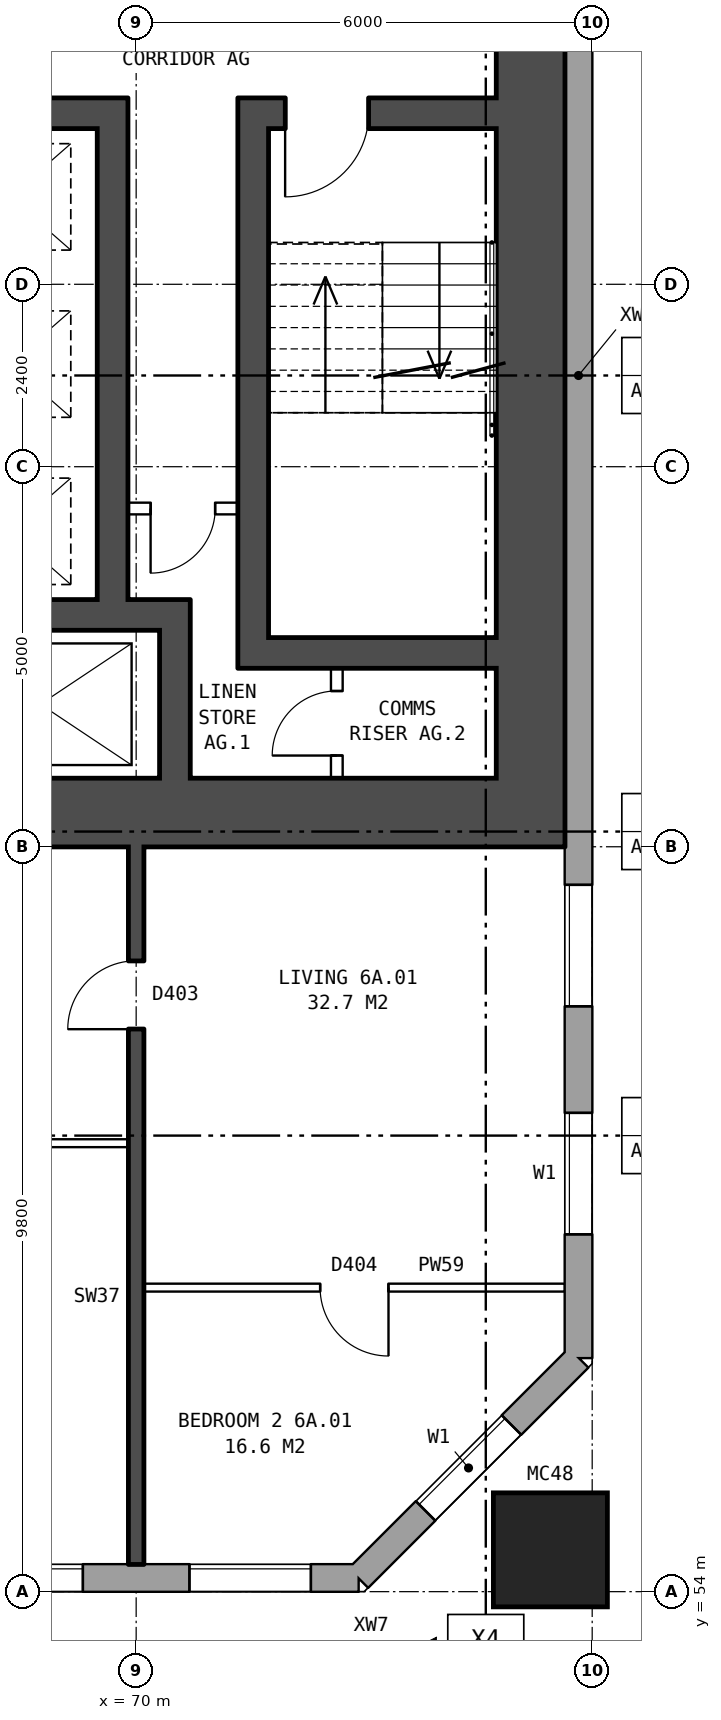
"""IFC4 building model, lengths in metres.
Left out: names, types, materials, properties, quantities, classifications, styles, units other than length and angle.
Written with IfcOpenShell. Run it as: python <this file> out.ifc"""

import sys

from ifc_helpers import new_model, si_unit, direction, frame, frame_2d, origin, origin_2d, place, context, subcontext, project, spatial, rectangle, hollow_rectangle, extrude, element, fill, save


model = new_model("IFC4")
c1 = context("Model", 3, precision=1e-05, world=origin(), true_north=direction((0.0, 1.0)))
c2 = subcontext(c1, "Body", "Model", "MODEL_VIEW")
j1 = project(units=[si_unit("LENGTHUNIT", "METRE"), si_unit("PLANEANGLEUNIT", "RADIAN")], contexts=[c1])
p1 = place(None, origin())
s1 = spatial("IfcSite", under=j1, at=p1, CompositionType="ELEMENT")
p2 = place(p1, origin())
s2 = spatial("IfcBuilding", under=s1, at=p2, CompositionType="ELEMENT")
p3 = place(p2, frame((0.0, 0.0, 25.7)))
s3 = spatial("IfcBuildingStorey", under=s2, at=p3, CompositionType="ELEMENT", Elevation=25.7)
p4 = place(p3, frame((75.45, 54.55, 0.0), z_axis=(0.0, 0.0, 1.0), x_axis=(1.0, 0.0, 0.0)))
e1 = element("IfcColumn", 1, at=p4, inside=s3, PredefinedType="COLUMN", context=c2, shape_type="SweptSolid", body=[
    extrude(hollow_rectangle(XDim=1.5, YDim=1.5, WallThickness=0.08, at=origin_2d()), origin(), (0.0, 0.0, 1.0), 3.1),
])
p5 = place(p3, frame((22.825, 54.18, 0.0), z_axis=(0.0, 0.0, 1.0), x_axis=(1.0, 0.0, 0.0)))
e2 = element("IfcWall", 2, at=p5, inside=s3, PredefinedType="STANDARD", context=c2, shape_type="SweptSolid", body=[
    extrude(rectangle(XDim=50.101, YDim=0.36, at=frame_2d((25.05, 0.0))), origin(), (0.0, 0.0, 1.0), 2.85),
])
p6 = place(p5, frame((2.875, 0.0, 0.8)))
e3 = element("IfcOpeningElement", 3, at=p6, cuts=e2, PredefinedType="OPENING", context=c2, shape_type="SweptSolid", body=[
    extrude(rectangle(XDim=1.6, YDim=1.8, at=frame_2d((0.8, 0.9))), frame((0.0, 0.19, 0.0), z_axis=(0.0, -1.0, 0.0), x_axis=(1.0, 0.0, 0.0)), (0.0, 0.0, 1.0), 0.38),
])
p7 = place(p5, frame((5.875, 0.0, 0.8)))
e4 = element("IfcOpeningElement", 4, at=p7, cuts=e2, PredefinedType="OPENING", context=c2, shape_type="SweptSolid", body=[
    extrude(rectangle(XDim=1.6, YDim=1.8, at=frame_2d((0.8, 0.9))), frame((0.0, 0.19, 0.0), z_axis=(0.0, -1.0, 0.0), x_axis=(1.0, 0.0, 0.0)), (0.0, 0.0, 1.0), 0.38),
])
p8 = place(p5, frame((7.775, 0.0, 1.6)))
e5 = element("IfcOpeningElement", 5, at=p8, cuts=e2, PredefinedType="OPENING", context=c2, shape_type="SweptSolid", body=[
    extrude(rectangle(XDim=0.8, YDim=0.9, at=frame_2d((0.4, 0.45))), frame((0.0, 0.19, 0.0), z_axis=(0.0, -1.0, 0.0), x_axis=(1.0, 0.0, 0.0)), (0.0, 0.0, 1.0), 0.38),
])
p9 = place(p5, frame((11.875, 0.0, 0.8)))
e6 = element("IfcOpeningElement", 6, at=p9, cuts=e2, PredefinedType="OPENING", context=c2, shape_type="SweptSolid", body=[
    extrude(rectangle(XDim=1.6, YDim=1.8, at=frame_2d((0.8, 0.9))), frame((0.0, 0.19, 0.0), z_axis=(0.0, -1.0, 0.0), x_axis=(1.0, 0.0, 0.0)), (0.0, 0.0, 1.0), 0.38),
])
p10 = place(p5, frame((14.875, 0.0, 0.8)))
e7 = element("IfcOpeningElement", 7, at=p10, cuts=e2, PredefinedType="OPENING", context=c2, shape_type="SweptSolid", body=[
    extrude(rectangle(XDim=1.6, YDim=1.8, at=frame_2d((0.8, 0.9))), frame((0.0, 0.19, 0.0), z_axis=(0.0, -1.0, 0.0), x_axis=(1.0, 0.0, 0.0)), (0.0, 0.0, 1.0), 0.38),
])
p11 = place(p5, frame((17.875, 0.0, 0.8)))
e8 = element("IfcOpeningElement", 8, at=p11, cuts=e2, PredefinedType="OPENING", context=c2, shape_type="SweptSolid", body=[
    extrude(rectangle(XDim=1.6, YDim=1.8, at=frame_2d((0.8, 0.9))), frame((0.0, 0.19, 0.0), z_axis=(0.0, -1.0, 0.0), x_axis=(1.0, 0.0, 0.0)), (0.0, 0.0, 1.0), 0.38),
])
p12 = place(p5, frame((20.875, 0.0, 0.8)))
e9 = element("IfcOpeningElement", 9, at=p12, cuts=e2, PredefinedType="OPENING", context=c2, shape_type="SweptSolid", body=[
    extrude(rectangle(XDim=1.6, YDim=1.8, at=frame_2d((0.8, 0.9))), frame((0.0, 0.19, 0.0), z_axis=(0.0, -1.0, 0.0), x_axis=(1.0, 0.0, 0.0)), (0.0, 0.0, 1.0), 0.38),
])
p13 = place(p5, frame((23.875, 0.0, 0.8)))
e10 = element("IfcOpeningElement", 10, at=p13, cuts=e2, PredefinedType="OPENING", context=c2, shape_type="SweptSolid", body=[
    extrude(rectangle(XDim=1.6, YDim=1.8, at=frame_2d((0.8, 0.9))), frame((0.0, 0.19, 0.0), z_axis=(0.0, -1.0, 0.0), x_axis=(1.0, 0.0, 0.0)), (0.0, 0.0, 1.0), 0.38),
])
p14 = place(p5, frame((26.875, 0.0, 0.8)))
e11 = element("IfcOpeningElement", 11, at=p14, cuts=e2, PredefinedType="OPENING", context=c2, shape_type="SweptSolid", body=[
    extrude(rectangle(XDim=1.6, YDim=1.8, at=frame_2d((0.8, 0.9))), frame((0.0, 0.19, 0.0), z_axis=(0.0, -1.0, 0.0), x_axis=(1.0, 0.0, 0.0)), (0.0, 0.0, 1.0), 0.38),
])
p15 = place(p5, frame((29.875, 0.0, 0.8)))
e12 = element("IfcOpeningElement", 12, at=p15, cuts=e2, PredefinedType="OPENING", context=c2, shape_type="SweptSolid", body=[
    extrude(rectangle(XDim=1.6, YDim=1.8, at=frame_2d((0.8, 0.9))), frame((0.0, 0.19, 0.0), z_axis=(0.0, -1.0, 0.0), x_axis=(1.0, 0.0, 0.0)), (0.0, 0.0, 1.0), 0.38),
])
p16 = place(p5, frame((32.875, 0.0, 0.8)))
e13 = element("IfcOpeningElement", 13, at=p16, cuts=e2, PredefinedType="OPENING", context=c2, shape_type="SweptSolid", body=[
    extrude(rectangle(XDim=1.6, YDim=1.8, at=frame_2d((0.8, 0.9))), frame((0.0, 0.19, 0.0), z_axis=(0.0, -1.0, 0.0), x_axis=(1.0, 0.0, 0.0)), (0.0, 0.0, 1.0), 0.38),
])
p17 = place(p5, frame((35.875, 0.0, 0.8)))
e14 = element("IfcOpeningElement", 14, at=p17, cuts=e2, PredefinedType="OPENING", context=c2, shape_type="SweptSolid", body=[
    extrude(rectangle(XDim=1.6, YDim=1.8, at=frame_2d((0.8, 0.9))), frame((0.0, 0.19, 0.0), z_axis=(0.0, -1.0, 0.0), x_axis=(1.0, 0.0, 0.0)), (0.0, 0.0, 1.0), 0.38),
])
p18 = place(p5, frame((38.325, 0.0, 0.15)))
e15 = element("IfcOpeningElement", 15, at=p18, cuts=e2, PredefinedType="OPENING", context=c2, shape_type="SweptSolid", body=[
    extrude(rectangle(XDim=1.2, YDim=1.8, at=frame_2d((0.6, 0.9))), frame((0.0, 0.19, 0.0), z_axis=(0.0, -1.0, 0.0), x_axis=(1.0, 0.0, 0.0)), (0.0, 0.0, 1.0), 0.38),
])
p19 = place(p5, frame((41.825, 0.0, 1.4)))
e16 = element("IfcOpeningElement", 16, at=p19, cuts=e2, PredefinedType="OPENING", context=c2, shape_type="SweptSolid", body=[
    extrude(rectangle(XDim=1.0, YDim=1.2, at=frame_2d((0.5, 0.6))), frame((0.0, 0.19, 0.0), z_axis=(0.0, -1.0, 0.0), x_axis=(1.0, 0.0, 0.0)), (0.0, 0.0, 1.0), 0.38),
])
p20 = place(p5, frame((44.875, 0.0, 0.8)))
e17 = element("IfcOpeningElement", 17, at=p20, cuts=e2, PredefinedType="OPENING", context=c2, shape_type="SweptSolid", body=[
    extrude(rectangle(XDim=1.6, YDim=1.8, at=frame_2d((0.8, 0.9))), frame((0.0, 0.19, 0.0), z_axis=(0.0, -1.0, 0.0), x_axis=(1.0, 0.0, 0.0)), (0.0, 0.0, 1.0), 0.38),
])
p21 = place(p5, frame((47.875, 0.0, 0.8)))
e18 = element("IfcOpeningElement", 18, at=p21, cuts=e2, PredefinedType="OPENING", context=c2, shape_type="SweptSolid", body=[
    extrude(rectangle(XDim=1.6, YDim=1.8, at=frame_2d((0.8, 0.9))), frame((0.0, 0.19, 0.0), z_axis=(0.0, -1.0, 0.0), x_axis=(1.0, 0.0, 0.0)), (0.0, 0.0, 1.0), 0.38),
])
p22 = place(p5, frame((10.175, 0.0, 0.8)))
e19 = element("IfcOpeningElement", 19, at=p22, cuts=e2, PredefinedType="OPENING", context=c2, shape_type="SweptSolid", body=[
    extrude(rectangle(XDim=0.8, YDim=0.9, at=frame_2d((0.4, 0.45))), frame((0.0, 0.19, 0.0), z_axis=(0.0, -1.0, 0.0), x_axis=(1.0, 0.0, 0.0)), (0.0, 0.0, 1.0), 0.38),
])
p23 = place(p5, frame((39.825, 0.0, 0.15)))
e20 = element("IfcOpeningElement", 20, at=p23, cuts=e2, PredefinedType="OPENING", context=c2, shape_type="SweptSolid", body=[
    extrude(rectangle(XDim=1.0, YDim=0.9, at=frame_2d((0.5, 0.45))), frame((0.0, 0.19, 0.0), z_axis=(0.0, -1.0, 0.0), x_axis=(1.0, 0.0, 0.0)), (0.0, 0.0, 1.0), 0.38),
])
p24 = place(p5, frame((43.125, 0.0, 0.8)))
e21 = element("IfcOpeningElement", 21, at=p24, cuts=e2, PredefinedType="OPENING", context=c2, shape_type="SweptSolid", body=[
    extrude(rectangle(XDim=1.4, YDim=1.8, at=frame_2d((0.7, 0.9))), frame((0.0, 0.19, 0.0), z_axis=(0.0, -1.0, 0.0), x_axis=(1.0, 0.0, 0.0)), (0.0, 0.0, 1.0), 0.38),
])
p25 = place(p3, frame((72.925, 54.18, 0.0), z_axis=(0.0, 0.0, 1.0), x_axis=(0.707106781187, 0.707106781187, 0.0)))
e22 = element("IfcWall", 22, at=p25, inside=s3, PredefinedType="STANDARD", context=c2, shape_type="SweptSolid", body=[
    extrude(rectangle(XDim=4.094, YDim=0.36, at=frame_2d((2.047, 0.0))), origin(), (0.0, 0.0, 1.0), 2.85),
])
p26 = place(p25, frame((1.247, 0.0, 0.8)))
e23 = element("IfcOpeningElement", 23, at=p26, cuts=e22, PredefinedType="OPENING", context=c2, shape_type="SweptSolid", body=[
    extrude(rectangle(XDim=1.6, YDim=1.8, at=frame_2d((0.8, 0.9))), frame((0.0, 0.19, 0.0), z_axis=(0.0, -1.0, 0.0), x_axis=(1.0, 0.0, 0.0)), (0.0, 0.0, 1.0), 0.38),
])
p27 = place(p3, frame((75.82, 57.075, 0.0), z_axis=(0.0, 0.0, 1.0), x_axis=(0.0, 1.0, 0.0)))
e24 = element("IfcWall", 24, at=p27, inside=s3, PredefinedType="STANDARD", context=c2, shape_type="SweptSolid", body=[
    extrude(rectangle(XDim=25.851, YDim=0.36, at=frame_2d((12.925, 0.0))), origin(), (0.0, 0.0, 1.0), 2.85),
])
p28 = place(p27, frame((1.625, 0.0, 0.8)))
e25 = element("IfcOpeningElement", 25, at=p28, cuts=e24, PredefinedType="OPENING", context=c2, shape_type="SweptSolid", body=[
    extrude(rectangle(XDim=1.6, YDim=1.8, at=frame_2d((0.8, 0.9))), frame((0.0, 0.19, 0.0), z_axis=(0.0, -1.0, 0.0), x_axis=(1.0, 0.0, 0.0)), (0.0, 0.0, 1.0), 0.38),
])
p29 = place(p27, frame((4.625, 0.0, 0.8)))
e26 = element("IfcOpeningElement", 26, at=p29, cuts=e24, PredefinedType="OPENING", context=c2, shape_type="SweptSolid", body=[
    extrude(rectangle(XDim=1.6, YDim=1.8, at=frame_2d((0.8, 0.9))), frame((0.0, 0.19, 0.0), z_axis=(0.0, -1.0, 0.0), x_axis=(1.0, 0.0, 0.0)), (0.0, 0.0, 1.0), 0.38),
])
p30 = place(p27, frame((19.625, 0.0, 0.8)))
e27 = element("IfcOpeningElement", 27, at=p30, cuts=e24, PredefinedType="OPENING", context=c2, shape_type="SweptSolid", body=[
    extrude(rectangle(XDim=1.6, YDim=1.8, at=frame_2d((0.8, 0.9))), frame((0.0, 0.19, 0.0), z_axis=(0.0, -1.0, 0.0), x_axis=(1.0, 0.0, 0.0)), (0.0, 0.0, 1.0), 0.38),
])
p31 = place(p27, frame((22.625, 0.0, 0.8)))
e28 = element("IfcOpeningElement", 28, at=p31, cuts=e24, PredefinedType="OPENING", context=c2, shape_type="SweptSolid", body=[
    extrude(rectangle(XDim=1.6, YDim=1.8, at=frame_2d((0.8, 0.9))), frame((0.0, 0.19, 0.0), z_axis=(0.0, -1.0, 0.0), x_axis=(1.0, 0.0, 0.0)), (0.0, 0.0, 1.0), 0.38),
])
p32 = place(p3, frame((75.19, 64.7, 0.0), z_axis=(0.0, 0.0, 1.0), x_axis=(0.0, 1.0, 0.0)))
e29 = element("IfcWall", 29, at=p32, inside=s3, PredefinedType="SHEAR", context=c2, shape_type="SweptSolid", body=[
    extrude(rectangle(XDim=10.6, YDim=0.9, at=frame_2d((5.3, 0.0))), origin(), (0.0, 0.0, 1.0), 2.85),
])
p33 = place(p3, frame((66.64, 64.25, 0.0), z_axis=(0.0, 0.0, 1.0), x_axis=(1.0, 0.0, 0.0)))
e30 = element("IfcWall", 30, at=p33, inside=s3, PredefinedType="SHEAR", context=c2, shape_type="SweptSolid", body=[
    extrude(rectangle(XDim=9.0, YDim=0.9, at=frame_2d((4.5, 0.0))), origin(), (0.0, 0.0, 1.0), 2.85),
])
p34 = place(p3, frame((71.74, 66.35, 0.0), z_axis=(0.0, 0.0, 1.0), x_axis=(1.0, 0.0, 0.0)))
e31 = element("IfcWall", 31, at=p34, inside=s3, PredefinedType="SHEAR", context=c2, shape_type="SweptSolid", body=[
    extrude(rectangle(XDim=3.0, YDim=0.4, at=frame_2d((1.5, 0.0))), origin(), (0.0, 0.0, 1.0), 2.85),
])
p35 = place(p3, frame((67.54, 66.85, 0.0), z_axis=(0.0, 0.0, 1.0), x_axis=(1.0, 0.0, 0.0)))
e32 = element("IfcWall", 32, at=p35, inside=s3, PredefinedType="SHEAR", context=c2, shape_type="SweptSolid", body=[
    extrude(rectangle(XDim=3.17, YDim=0.4, at=frame_2d((1.585, 0.0))), origin(), (0.0, 0.0, 1.0), 2.85),
])
p36 = place(p3, frame((69.89, 68.25, 0.0), z_axis=(0.0, 0.0, 1.0), x_axis=(1.0, 0.0, 0.0)))
e33 = element("IfcWall", 33, at=p36, inside=s3, PredefinedType="PARTITIONING", context=c2, shape_type="SweptSolid", body=[
    extrude(rectangle(XDim=1.45, YDim=0.15, at=frame_2d((0.725, 0.0))), origin(), (0.0, 0.0, 1.0), 2.85),
])
p37 = place(p36, frame((0.3, 0.0, 0.0)))
e34 = element("IfcOpeningElement", 34, at=p37, cuts=e33, PredefinedType="OPENING", context=c2, shape_type="SweptSolid", body=[
    extrude(rectangle(XDim=0.85, YDim=2.1, at=frame_2d((0.425, 1.05))), frame((0.0, 0.085, 0.0), z_axis=(0.0, -1.0, 0.0), x_axis=(1.0, 0.0, 0.0)), (0.0, 0.0, 1.0), 0.17),
])
p38 = place(p3, frame((67.54, 73.45, 0.0), z_axis=(0.0, 0.0, 1.0), x_axis=(1.0, 0.0, 0.0)))
e35 = element("IfcWall", 35, at=p38, inside=s3, PredefinedType="SHEAR", context=c2, shape_type="SweptSolid", body=[
    extrude(rectangle(XDim=1.95, YDim=0.4, at=frame_2d((0.975, 0.0))), origin(), (0.0, 0.0, 1.0), 2.85),
])
p39 = place(p3, frame((71.74, 73.45, 0.0), z_axis=(0.0, 0.0, 1.0), x_axis=(1.0, 0.0, 0.0)))
e36 = element("IfcWall", 36, at=p39, inside=s3, PredefinedType="SHEAR", context=c2, shape_type="SweptSolid", body=[
    extrude(rectangle(XDim=3.0, YDim=0.4, at=frame_2d((1.5, 0.0))), origin(), (0.0, 0.0, 1.0), 2.85),
])
p40 = place(p39, frame((0.22, 0.0, 0.0)))
e37 = element("IfcOpeningElement", 37, at=p40, cuts=e36, PredefinedType="OPENING", context=c2, shape_type="SweptSolid", body=[
    extrude(rectangle(XDim=1.1, YDim=2.1, at=frame_2d((0.55, 1.05))), frame((0.0, 0.21, 0.0), z_axis=(0.0, -1.0, 0.0), x_axis=(1.0, 0.0, 0.0)), (0.0, 0.0, 1.0), 0.42),
])
p41 = place(p3, frame((69.69, 67.05, 0.0), z_axis=(0.0, 0.0, 1.0), x_axis=(0.0, 1.0, 0.0)))
e38 = element("IfcWall", 38, at=p41, inside=s3, PredefinedType="SHEAR", context=c2, shape_type="SweptSolid", body=[
    extrude(rectangle(XDim=6.6, YDim=0.4, at=frame_2d((3.3, 0.0))), origin(), (0.0, 0.0, 1.0), 2.85),
])
p42 = place(p3, frame((70.51, 64.7, 0.0), z_axis=(0.0, 0.0, 1.0), x_axis=(0.0, 1.0, 0.0)))
e39 = element("IfcWall", 39, at=p42, inside=s3, PredefinedType="SHEAR", context=c2, shape_type="SweptSolid", body=[
    extrude(rectangle(XDim=1.95, YDim=0.4, at=frame_2d((0.975, 0.0))), origin(), (0.0, 0.0, 1.0), 2.85),
])
p43 = place(p3, frame((71.54, 66.15, 0.0), z_axis=(0.0, 0.0, 1.0), x_axis=(0.0, 1.0, 0.0)))
e40 = element("IfcWall", 40, at=p43, inside=s3, PredefinedType="SHEAR", context=c2, shape_type="SweptSolid", body=[
    extrude(rectangle(XDim=7.5, YDim=0.4, at=frame_2d((3.75, 0.0))), origin(), (0.0, 0.0, 1.0), 2.85),
])
p44 = place(p3, frame((72.64, 64.7, 0.0), z_axis=(0.0, 0.0, 1.0), x_axis=(0.0, 1.0, 0.0)))
e41 = element("IfcWall", 41, at=p44, inside=s3, PredefinedType="PARTITIONING", context=c2, shape_type="SweptSolid", body=[
    extrude(rectangle(XDim=1.45, YDim=0.15, at=frame_2d((0.725, 0.0))), origin(), (0.0, 0.0, 1.0), 2.85),
])
p45 = place(p44, frame((0.3, 0.0, 0.0)))
e42 = element("IfcOpeningElement", 42, at=p45, cuts=e41, PredefinedType="OPENING", context=c2, shape_type="SweptSolid", body=[
    extrude(rectangle(XDim=0.85, YDim=2.1, at=frame_2d((0.425, 1.05))), frame((0.0, 0.085, 0.0), z_axis=(0.0, -1.0, 0.0), x_axis=(1.0, 0.0, 0.0)), (0.0, 0.0, 1.0), 0.17),
])
p46 = place(p3, frame((70.1, 58.0, 0.0), z_axis=(0.0, 0.0, 1.0), x_axis=(1.0, 0.0, 0.0)))
e43 = element("IfcWall", 43, at=p46, inside=s3, PredefinedType="PARTITIONING", context=c2, shape_type="SweptSolid", body=[
    extrude(rectangle(XDim=5.54, YDim=0.1, at=frame_2d((2.77, 0.0))), origin(), (0.0, 0.0, 1.0), 2.85),
])
p47 = place(p46, frame((2.32, 0.0, 0.0)))
e44 = element("IfcOpeningElement", 44, at=p47, cuts=e43, PredefinedType="OPENING", context=c2, shape_type="SweptSolid", body=[
    extrude(rectangle(XDim=0.9, YDim=2.1, at=frame_2d((0.45, 1.05))), frame((0.0, 0.06, 0.0), z_axis=(0.0, -1.0, 0.0), x_axis=(1.0, 0.0, 0.0)), (0.0, 0.0, 1.0), 0.12),
])
p48 = place(p3, frame((64.1, 59.9, 0.0), z_axis=(0.0, 0.0, 1.0), x_axis=(1.0, 0.0, 0.0)))
e45 = element("IfcWall", 45, at=p48, inside=s3, PredefinedType="PARTITIONING", context=c2, shape_type="SweptSolid", body=[
    extrude(rectangle(XDim=5.8, YDim=0.1, at=frame_2d((2.9, 0.0))), origin(), (0.0, 0.0, 1.0), 2.85),
])
p49 = place(p48, frame((3.6, 0.0, 0.0)))
e46 = element("IfcOpeningElement", 46, at=p49, cuts=e45, PredefinedType="OPENING", context=c2, shape_type="SweptSolid", body=[
    extrude(rectangle(XDim=0.9, YDim=2.1, at=frame_2d((0.45, 1.05))), frame((0.0, 0.06, 0.0), z_axis=(0.0, -1.0, 0.0), x_axis=(1.0, 0.0, 0.0)), (0.0, 0.0, 1.0), 0.12),
])
p50 = place(p48, frame((0.7, 0.0, 0.0)))
e47 = element("IfcOpeningElement", 47, at=p50, cuts=e45, PredefinedType="OPENING", context=c2, shape_type="SweptSolid", body=[
    extrude(rectangle(XDim=0.9, YDim=2.1, at=frame_2d((0.45, 1.05))), frame((0.0, 0.06, 0.0), z_axis=(0.0, -1.0, 0.0), x_axis=(1.0, 0.0, 0.0)), (0.0, 0.0, 1.0), 0.12),
])
p51 = place(p3, frame((70.0, 54.36, 0.0), z_axis=(0.0, 0.0, 1.0), x_axis=(0.0, 1.0, 0.0)))
e48 = element("IfcWall", 48, at=p51, inside=s3, PredefinedType="SOLIDWALL", context=c2, shape_type="SweptSolid", body=[
    extrude(rectangle(XDim=9.44, YDim=0.2, at=frame_2d((4.72, 0.0))), origin(), (0.0, 0.0, 1.0), 2.85),
])
p52 = place(p51, frame((7.04, 0.0, 0.0)))
e49 = element("IfcOpeningElement", 49, at=p52, cuts=e48, PredefinedType="OPENING", context=c2, shape_type="SweptSolid", body=[
    extrude(rectangle(XDim=0.9, YDim=2.1, at=frame_2d((0.45, 1.05))), frame((0.0, 0.11, 0.0), z_axis=(0.0, -1.0, 0.0), x_axis=(1.0, 0.0, 0.0)), (0.0, 0.0, 1.0), 0.22),
])
p53 = place(p20, origin())
e50 = element("IfcWindow", 50, at=p53, inside=s3, PartitioningType="SINGLE_PANEL", PredefinedType="WINDOW", context=c2, shape_type="SweptSolid", body=[
    extrude(rectangle(XDim=1.6, YDim=1.8, at=frame_2d((0.8, 0.9))), frame((0.0, 0.15, 0.0), z_axis=(0.0, -1.0, 0.0), x_axis=(1.0, 0.0, 0.0)), (0.0, 0.0, 1.0), 0.06),
])
fill(e17, e50)
p54 = place(p21, origin())
e51 = element("IfcWindow", 51, at=p54, inside=s3, PartitioningType="SINGLE_PANEL", PredefinedType="WINDOW", context=c2, shape_type="SweptSolid", body=[
    extrude(rectangle(XDim=1.6, YDim=1.8, at=frame_2d((0.8, 0.9))), frame((0.0, 0.15, 0.0), z_axis=(0.0, -1.0, 0.0), x_axis=(1.0, 0.0, 0.0)), (0.0, 0.0, 1.0), 0.06),
])
fill(e18, e51)
p55 = place(p26, origin())
e52 = element("IfcWindow", 52, at=p55, inside=s3, PartitioningType="SINGLE_PANEL", PredefinedType="WINDOW", context=c2, shape_type="SweptSolid", body=[
    extrude(rectangle(XDim=1.6, YDim=1.8, at=frame_2d((0.8, 0.9))), frame((0.0, 0.15, 0.0), z_axis=(0.0, -1.0, 0.0), x_axis=(1.0, 0.0, 0.0)), (0.0, 0.0, 1.0), 0.06),
])
fill(e23, e52)
p56 = place(p28, origin())
e53 = element("IfcWindow", 53, at=p56, inside=s3, PartitioningType="SINGLE_PANEL", PredefinedType="WINDOW", context=c2, shape_type="SweptSolid", body=[
    extrude(rectangle(XDim=1.6, YDim=1.8, at=frame_2d((0.8, 0.9))), frame((0.0, 0.15, 0.0), z_axis=(0.0, -1.0, 0.0), x_axis=(1.0, 0.0, 0.0)), (0.0, 0.0, 1.0), 0.06),
])
fill(e25, e53)
p57 = place(p29, origin())
e54 = element("IfcWindow", 54, at=p57, inside=s3, PartitioningType="SINGLE_PANEL", PredefinedType="WINDOW", context=c2, shape_type="SweptSolid", body=[
    extrude(rectangle(XDim=1.6, YDim=1.8, at=frame_2d((0.8, 0.9))), frame((0.0, 0.15, 0.0), z_axis=(0.0, -1.0, 0.0), x_axis=(1.0, 0.0, 0.0)), (0.0, 0.0, 1.0), 0.06),
])
fill(e26, e54)
p58 = place(p40, frame((1.1, 0.0, 0.0), z_axis=(0.0, 0.0, 1.0), x_axis=(-1.0, 0.0, 0.0)))
e55 = element("IfcDoor", 55, at=p58, inside=s3, OperationType="SINGLE_SWING_RIGHT", PredefinedType="DOOR", context=c2, shape_type="SweptSolid", body=[
    extrude(rectangle(XDim=1.1, YDim=2.1, at=frame_2d((0.55, 1.05))), frame((0.0, 0.025, 0.0), z_axis=(0.0, -1.0, 0.0), x_axis=(1.0, 0.0, 0.0)), (0.0, 0.0, 1.0), 0.05),
])
fill(e37, e55)
p59 = place(p37, frame((0.85, 0.0, 0.0), z_axis=(0.0, 0.0, 1.0), x_axis=(-1.0, 0.0, 0.0)))
e56 = element("IfcDoor", 56, at=p59, inside=s3, OperationType="SINGLE_SWING_RIGHT", PredefinedType="DOOR", context=c2, shape_type="SweptSolid", body=[
    extrude(rectangle(XDim=0.85, YDim=2.1, at=frame_2d((0.425, 1.05))), frame((0.0, 0.025, 0.0), z_axis=(0.0, -1.0, 0.0), x_axis=(1.0, 0.0, 0.0)), (0.0, 0.0, 1.0), 0.05),
])
fill(e34, e56)
p60 = place(p45, origin())
e57 = element("IfcDoor", 57, at=p60, inside=s3, OperationType="SINGLE_SWING_LEFT", PredefinedType="DOOR", context=c2, shape_type="SweptSolid", body=[
    extrude(rectangle(XDim=0.85, YDim=2.1, at=frame_2d((0.425, 1.05))), frame((0.0, 0.025, 0.0), z_axis=(0.0, -1.0, 0.0), x_axis=(1.0, 0.0, 0.0)), (0.0, 0.0, 1.0), 0.05),
])
fill(e42, e57)
p61 = place(p47, frame((0.9, 0.0, 0.0), z_axis=(0.0, 0.0, 1.0), x_axis=(-1.0, 0.0, 0.0)))
e58 = element("IfcDoor", 58, at=p61, inside=s3, OperationType="SINGLE_SWING_LEFT", PredefinedType="DOOR", context=c2, shape_type="SweptSolid", body=[
    extrude(rectangle(XDim=0.9, YDim=2.1, at=frame_2d((0.45, 1.05))), frame((0.0, 0.025, 0.0), z_axis=(0.0, -1.0, 0.0), x_axis=(1.0, 0.0, 0.0)), (0.0, 0.0, 1.0), 0.05),
])
fill(e44, e58)
p62 = place(p52, origin())
e59 = element("IfcDoor", 59, at=p62, inside=s3, OperationType="SINGLE_SWING_LEFT", PredefinedType="DOOR", context=c2, shape_type="SweptSolid", body=[
    extrude(rectangle(XDim=0.9, YDim=2.1, at=frame_2d((0.45, 1.05))), frame((0.0, 0.025, 0.0), z_axis=(0.0, -1.0, 0.0), x_axis=(1.0, 0.0, 0.0)), (0.0, 0.0, 1.0), 0.05),
])
fill(e49, e59)
save(model, sys.argv[1])
